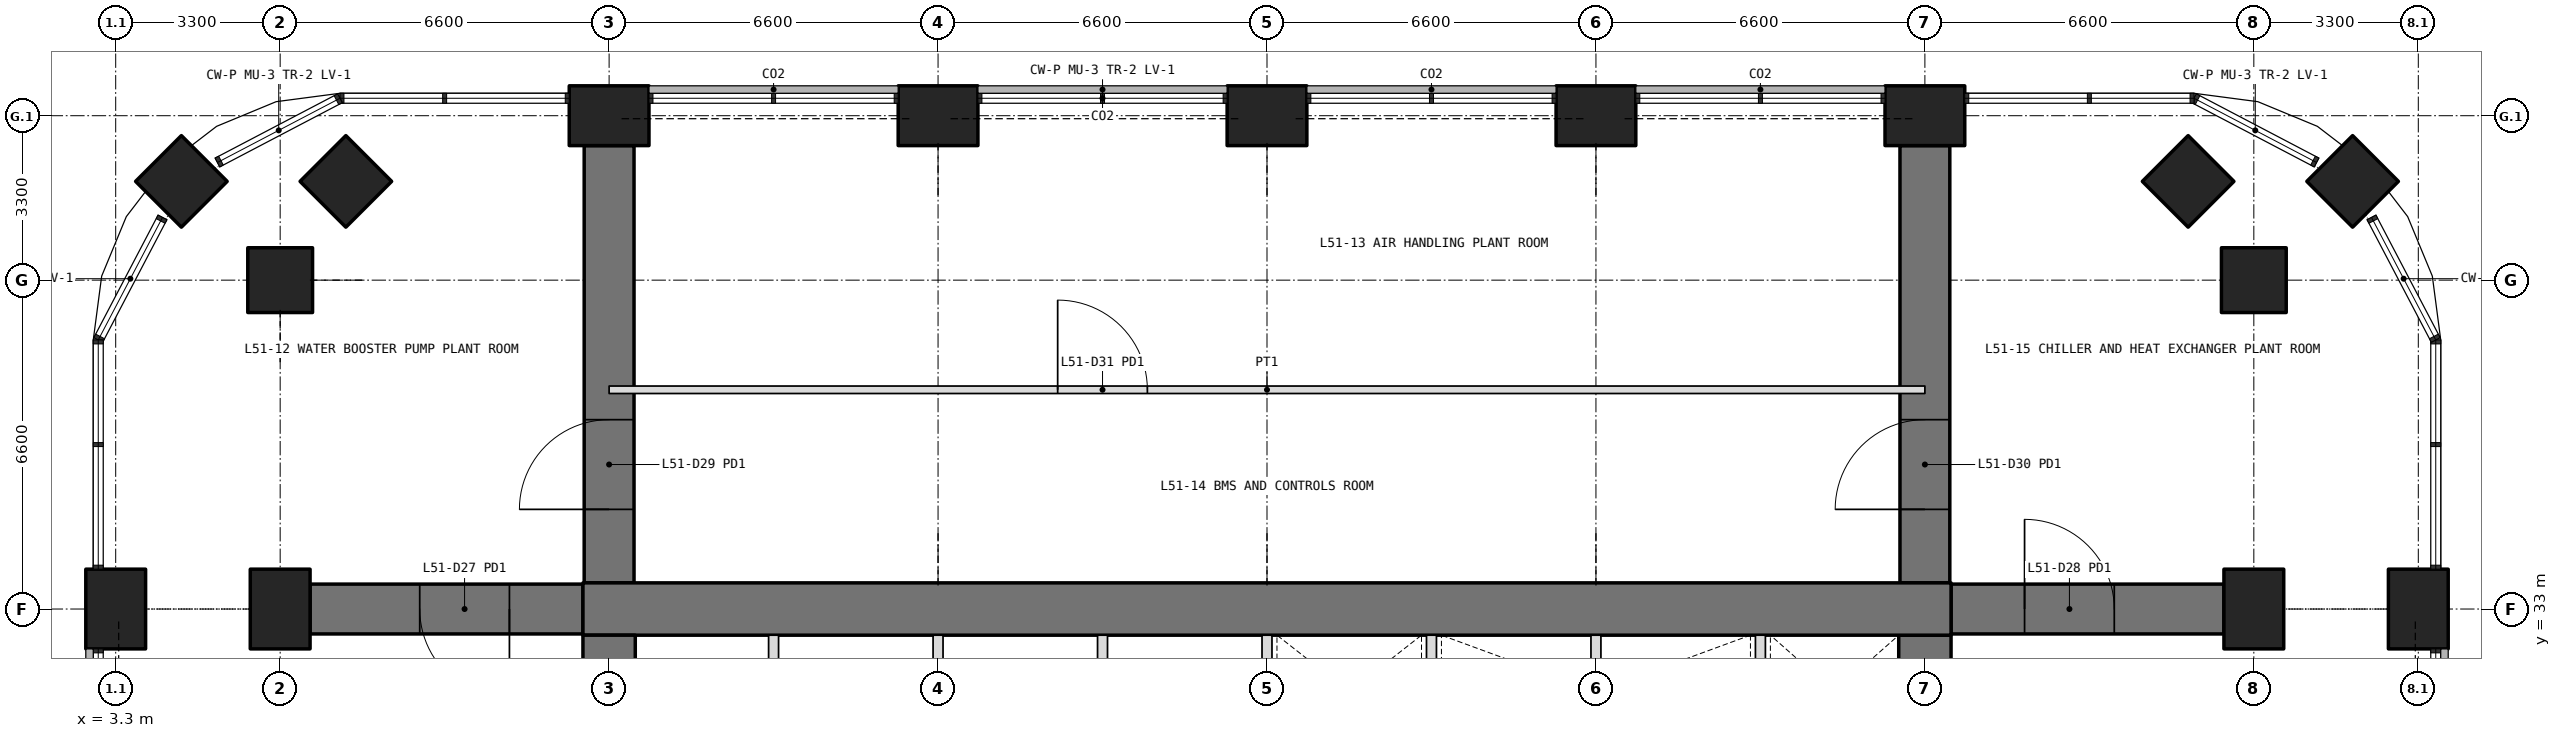
"""IFC4 building model, lengths in metres.
Left out: names, types, materials, properties, quantities, classifications, styles, units other than length and angle.
Written with IfcOpenShell. Run it as: python <this file> out.ifc"""

import sys

from ifc_helpers import new_model, si_unit, direction, frame, frame_2d, origin, origin_2d, place, context, subcontext, project, spatial, rectangle, extrude, element, fill, save


model = new_model("IFC4")
c1 = context("Model", 3, precision=1e-05, world=origin(), true_north=direction((0.0, 1.0)))
c2 = subcontext(c1, "Body", "Model", "MODEL_VIEW")
j1 = project(units=[si_unit("LENGTHUNIT", "METRE"), si_unit("PLANEANGLEUNIT", "RADIAN")], contexts=[c1])
p1 = place(None, origin())
s1 = spatial("IfcSite", under=j1, at=p1, CompositionType="ELEMENT")
p2 = place(p1, origin())
s2 = spatial("IfcBuilding", under=s1, at=p2, CompositionType="ELEMENT")
p3 = place(p2, frame((0.0, 0.0, 222.9)))
s3 = spatial("IfcBuildingStorey", under=s2, at=p3, CompositionType="ELEMENT", Elevation=222.9)
for number, where, z_axis, x_axis in (
    (1, (4.618, 41.582, 0.0), (0.0, 0.0, 1.0), (0.707, 0.707, 0.0)),
    (2, (48.182, 41.582, 0.0), (0.0, 0.0, 1.0), (0.707, 0.707, 0.0)),
):
    element("IfcColumn", number, at=place(p3, frame(where, z_axis=z_axis, x_axis=x_axis)), inside=s3, PredefinedType="COLUMN", context=c2, shape_type="SweptSolid", body=[
        extrude(rectangle(XDim=1.3, YDim=1.3, at=origin_2d()), origin(), (0.0, 0.0, 1.0), 6.3),
    ])
for number, where, z_axis, x_axis in (
    (3, (3.3, 33.0, 0.0), (0.0, 0.0, 1.0), (0.0, 1.0, 0.0)),
    (4, (49.5, 33.0, 0.0), (0.0, 0.0, 1.0), (0.0, 1.0, 0.0)),
    (5, (13.2, 42.9, 0.0), (0.0, 0.0, 1.0), (1.0, 0.0, 0.0)),
    (6, (19.8, 42.9, 0.0), (0.0, 0.0, 1.0), (1.0, 0.0, 0.0)),
    (7, (26.4, 42.9, 0.0), (0.0, 0.0, 1.0), (1.0, 0.0, 0.0)),
    (8, (33.0, 42.9, 0.0), (0.0, 0.0, 1.0), (1.0, 0.0, 0.0)),
    (9, (39.6, 42.9, 0.0), (0.0, 0.0, 1.0), (1.0, 0.0, 0.0)),
):
    element("IfcColumn", number, at=place(p3, frame(where, z_axis=z_axis, x_axis=x_axis)), inside=s3, PredefinedType="COLUMN", context=c2, shape_type="SweptSolid", body=[
        extrude(rectangle(XDim=1.6, YDim=1.2, at=origin_2d()), origin(), (0.0, 0.0, 1.0), 6.3),
    ])
for number, where, z_axis, x_axis in (
    (10, (6.6, 39.6, 0.0), (0.0, 0.0, 1.0), (1.0, 0.0, 0.0)),
    (11, (46.2, 39.6, 0.0), (0.0, 0.0, 1.0), (1.0, 0.0, 0.0)),
    (12, (7.918, 41.582, 0.0), (0.0, 0.0, 1.0), (0.707, 0.707, 0.0)),
    (13, (44.882, 41.582, 0.0), (0.0, 0.0, 1.0), (0.707, 0.707, 0.0)),
):
    element("IfcColumn", number, at=place(p3, frame(where, z_axis=z_axis, x_axis=x_axis)), inside=s3, PredefinedType="COLUMN", context=c2, shape_type="SweptSolid", body=[
        extrude(rectangle(XDim=1.3, YDim=1.3, at=origin_2d()), origin(), (0.0, 0.0, 1.0), 6.3),
    ])
for number, where, z_axis, x_axis in (
    (14, (6.6, 33.0, 0.0), (0.0, 0.0, 1.0), (0.0, 1.0, 0.0)),
    (15, (46.2, 33.0, 0.0), (0.0, 0.0, 1.0), (0.0, 1.0, 0.0)),
):
    element("IfcColumn", number, at=place(p3, frame(where, z_axis=z_axis, x_axis=x_axis)), inside=s3, PredefinedType="COLUMN", context=c2, shape_type="SweptSolid", body=[
        extrude(rectangle(XDim=1.6, YDim=1.2, at=origin_2d()), origin(), (0.0, 0.0, 1.0), 6.3),
    ])
p4 = place(p3, frame((13.2, 33.525, 0.0), z_axis=(0.0, 0.0, 1.0), x_axis=(0.0, 1.0, 0.0)))
e16 = element("IfcWall", 16, at=p4, inside=s3, PredefinedType="SHEAR", context=c2, shape_type="SweptSolid", body=[
    extrude(rectangle(XDim=8.775, YDim=1.0, at=frame_2d((4.388, 0.0))), origin(), (0.0, 0.0, 1.0), 6.0),
])
p5 = place(p4, frame((1.475, 0.0, 0.0)))
e17 = element("IfcOpeningElement", 17, at=p5, cuts=e16, PredefinedType="OPENING", context=c2, shape_type="SweptSolid", body=[
    extrude(rectangle(XDim=1.8, YDim=2.4, at=frame_2d((0.9, 1.2))), frame((0.0, 0.51, 0.0), z_axis=(0.0, -1.0, 0.0), x_axis=(1.0, 0.0, 0.0)), (0.0, 0.0, 1.0), 1.02),
])
p6 = place(p3, frame((39.6, 33.525, 0.0), z_axis=(0.0, 0.0, 1.0), x_axis=(0.0, 1.0, 0.0)))
e18 = element("IfcWall", 18, at=p6, inside=s3, PredefinedType="SHEAR", context=c2, shape_type="SweptSolid", body=[
    extrude(rectangle(XDim=8.775, YDim=1.0, at=frame_2d((4.388, 0.0))), origin(), (0.0, 0.0, 1.0), 6.0),
])
p7 = place(p6, frame((1.475, 0.0, 0.0)))
e19 = element("IfcOpeningElement", 19, at=p7, cuts=e18, PredefinedType="OPENING", context=c2, shape_type="SweptSolid", body=[
    extrude(rectangle(XDim=1.8, YDim=2.4, at=frame_2d((0.9, 1.2))), frame((0.0, 0.51, 0.0), z_axis=(0.0, -1.0, 0.0), x_axis=(1.0, 0.0, 0.0)), (0.0, 0.0, 1.0), 1.02),
])
p8 = place(p3, frame((12.675, 33.0, 0.0), z_axis=(0.0, 0.0, 1.0), x_axis=(-1.0, 0.0, 0.0)))
e20 = element("IfcWall", 20, at=p8, inside=s3, PredefinedType="SHEAR", context=c2, shape_type="SweptSolid", body=[
    extrude(rectangle(XDim=5.475, YDim=1.0, at=frame_2d((2.738, 0.0))), origin(), (0.0, 0.0, 1.0), 6.0),
])
p9 = place(p8, frame((1.475, 0.0, 0.0)))
e21 = element("IfcOpeningElement", 21, at=p9, cuts=e20, PredefinedType="OPENING", context=c2, shape_type="SweptSolid", body=[
    extrude(rectangle(XDim=1.8, YDim=2.4, at=frame_2d((0.9, 1.2))), frame((0.0, 0.51, 0.0), z_axis=(0.0, -1.0, 0.0), x_axis=(1.0, 0.0, 0.0)), (0.0, 0.0, 1.0), 1.02),
])
p10 = place(p3, frame((40.125, 33.0, 0.0), z_axis=(0.0, 0.0, 1.0), x_axis=(1.0, 0.0, 0.0)))
e22 = element("IfcWall", 22, at=p10, inside=s3, PredefinedType="SHEAR", context=c2, shape_type="SweptSolid", body=[
    extrude(rectangle(XDim=5.475, YDim=1.0, at=frame_2d((2.738, 0.0))), origin(), (0.0, 0.0, 1.0), 6.0),
])
p11 = place(p10, frame((1.475, 0.0, 0.0)))
e23 = element("IfcOpeningElement", 23, at=p11, cuts=e22, PredefinedType="OPENING", context=c2, shape_type="SweptSolid", body=[
    extrude(rectangle(XDim=1.8, YDim=2.4, at=frame_2d((0.9, 1.2))), frame((0.0, 0.51, 0.0), z_axis=(0.0, -1.0, 0.0), x_axis=(1.0, 0.0, 0.0)), (0.0, 0.0, 1.0), 1.02),
])
p12 = place(p3, frame((39.6, 13.725, 0.0), z_axis=(0.0, 0.0, 1.0), x_axis=(0.0, 1.0, 0.0)))
e24 = element("IfcWall", 24, at=p12, inside=s3, PredefinedType="SHEAR", context=c2, shape_type="SweptSolid", body=[
    extrude(rectangle(XDim=18.75, YDim=1.05, at=frame_2d((9.375, 0.0))), origin(), (0.0, 0.0, 1.0), 6.3),
])
p13 = place(p12, frame((3.025, 0.0, 0.0)))
e25 = element("IfcOpeningElement", 25, at=p13, cuts=e24, PredefinedType="OPENING", context=c2, shape_type="SweptSolid", body=[
    extrude(rectangle(XDim=1.6, YDim=2.1, at=frame_2d((0.8, 1.05))), frame((0.0, 0.535, 0.0), z_axis=(0.0, -1.0, 0.0), x_axis=(1.0, 0.0, 0.0)), (0.0, 0.0, 1.0), 1.07),
])
p14 = place(p12, frame((13.825, 0.0, 0.0)))
e26 = element("IfcOpeningElement", 26, at=p14, cuts=e24, PredefinedType="OPENING", context=c2, shape_type="SweptSolid", body=[
    extrude(rectangle(XDim=1.6, YDim=2.1, at=frame_2d((0.8, 1.05))), frame((0.0, 0.535, 0.0), z_axis=(0.0, -1.0, 0.0), x_axis=(1.0, 0.0, 0.0)), (0.0, 0.0, 1.0), 1.07),
])
p15 = place(p3, frame((40.125, 33.0, 0.0), z_axis=(0.0, 0.0, 1.0), x_axis=(-1.0, 0.0, 0.0)))
e27 = element("IfcWall", 27, at=p15, inside=s3, PredefinedType="SHEAR", context=c2, shape_type="SweptSolid", body=[
    extrude(rectangle(XDim=27.45, YDim=1.05, at=frame_2d((13.725, 0.0))), origin(), (0.0, 0.0, 1.0), 6.3),
])
p16 = place(p3, frame((13.2, 32.475, 0.0), z_axis=(0.0, 0.0, 1.0), x_axis=(0.0, -1.0, 0.0)))
e28 = element("IfcWall", 28, at=p16, inside=s3, PredefinedType="SHEAR", context=c2, shape_type="SweptSolid", body=[
    extrude(rectangle(XDim=18.75, YDim=1.05, at=frame_2d((9.375, 0.0))), origin(), (0.0, 0.0, 1.0), 6.3),
])
p17 = place(p16, frame((14.125, 0.0, 0.0)))
e29 = element("IfcOpeningElement", 29, at=p17, cuts=e28, PredefinedType="OPENING", context=c2, shape_type="SweptSolid", body=[
    extrude(rectangle(XDim=1.6, YDim=2.1, at=frame_2d((0.8, 1.05))), frame((0.0, 0.535, 0.0), z_axis=(0.0, -1.0, 0.0), x_axis=(1.0, 0.0, 0.0)), (0.0, 0.0, 1.0), 1.07),
])
p18 = place(p16, frame((3.325, 0.0, 0.0)))
e30 = element("IfcOpeningElement", 30, at=p18, cuts=e28, PredefinedType="OPENING", context=c2, shape_type="SweptSolid", body=[
    extrude(rectangle(XDim=1.6, YDim=2.1, at=frame_2d((0.8, 1.05))), frame((0.0, 0.535, 0.0), z_axis=(0.0, -1.0, 0.0), x_axis=(1.0, 0.0, 0.0)), (0.0, 0.0, 1.0), 1.07),
])
for number, where, z_axis, x_axis in (
    (31, (16.5, 30.2, 0.0), (0.0, 0.0, 1.0), (0.0, 1.0, 0.0)),
    (32, (19.8, 30.2, 0.0), (0.0, 0.0, 1.0), (0.0, 1.0, 0.0)),
    (33, (23.1, 30.2, 0.0), (0.0, 0.0, 1.0), (0.0, 1.0, 0.0)),
    (34, (26.4, 30.2, 0.0), (0.0, 0.0, 1.0), (0.0, 1.0, 0.0)),
    (35, (29.7, 30.2, 0.0), (0.0, 0.0, 1.0), (0.0, 1.0, 0.0)),
    (36, (33.0, 30.2, 0.0), (0.0, 0.0, 1.0), (0.0, 1.0, 0.0)),
    (37, (36.3, 30.2, 0.0), (0.0, 0.0, 1.0), (0.0, 1.0, 0.0)),
):
    element("IfcWall", number, at=place(p3, frame(where, z_axis=z_axis, x_axis=x_axis)), inside=s3, PredefinedType="PARTITIONING", context=c2, shape_type="SweptSolid", body=[
        extrude(rectangle(XDim=2.275, YDim=0.2, at=frame_2d((1.138, 0.0))), origin(), (0.0, 0.0, 1.0), 6.3),
    ])
p19 = place(p3, frame((13.2, 37.4, 0.0), z_axis=(0.0, 0.0, 1.0), x_axis=(1.0, 0.0, 0.0)))
e38 = element("IfcWall", 38, at=p19, inside=s3, PredefinedType="PARTITIONING", context=c2, shape_type="SweptSolid", body=[
    extrude(rectangle(XDim=26.4, YDim=0.15, at=frame_2d((13.2, 0.0))), origin(), (0.0, 0.0, 1.0), 4.0),
])
p20 = place(p19, frame((9.0, 0.0, 0.0)))
e39 = element("IfcOpeningElement", 39, at=p20, cuts=e38, PredefinedType="OPENING", context=c2, shape_type="SweptSolid", body=[
    extrude(rectangle(XDim=1.8, YDim=2.4, at=frame_2d((0.9, 1.2))), frame((0.0, 0.085, 0.0), z_axis=(0.0, -1.0, 0.0), x_axis=(1.0, 0.0, 0.0)), (0.0, 0.0, 1.0), 0.17),
])
p21 = place(p20, origin())
e40 = element("IfcDoor", 40, at=p21, inside=s3, OperationType="DOUBLE_DOOR_SINGLE_SWING", PredefinedType="DOOR", context=c2, shape_type="SweptSolid", body=[
    extrude(rectangle(XDim=1.8, YDim=2.4, at=frame_2d((0.9, 1.2))), frame((0.0, 0.025, 0.0), z_axis=(0.0, -1.0, 0.0), x_axis=(1.0, 0.0, 0.0)), (0.0, 0.0, 1.0), 0.05),
])
fill(e39, e40)
p22 = place(p5, origin())
e41 = element("IfcDoor", 41, at=p22, inside=s3, OperationType="DOUBLE_DOOR_SINGLE_SWING", PredefinedType="DOOR", context=c2, shape_type="SweptSolid", body=[
    extrude(rectangle(XDim=1.8, YDim=2.4, at=frame_2d((0.9, 1.2))), frame((0.0, 0.025, 0.0), z_axis=(0.0, -1.0, 0.0), x_axis=(1.0, 0.0, 0.0)), (0.0, 0.0, 1.0), 0.05),
])
fill(e17, e41)
p23 = place(p7, origin())
e42 = element("IfcDoor", 42, at=p23, inside=s3, OperationType="DOUBLE_DOOR_SINGLE_SWING", PredefinedType="DOOR", context=c2, shape_type="SweptSolid", body=[
    extrude(rectangle(XDim=1.8, YDim=2.4, at=frame_2d((0.9, 1.2))), frame((0.0, 0.025, 0.0), z_axis=(0.0, -1.0, 0.0), x_axis=(1.0, 0.0, 0.0)), (0.0, 0.0, 1.0), 0.05),
])
fill(e19, e42)
p24 = place(p9, origin())
e43 = element("IfcDoor", 43, at=p24, inside=s3, OperationType="DOUBLE_DOOR_SINGLE_SWING", PredefinedType="DOOR", context=c2, shape_type="SweptSolid", body=[
    extrude(rectangle(XDim=1.8, YDim=2.4, at=frame_2d((0.9, 1.2))), frame((0.0, 0.025, 0.0), z_axis=(0.0, -1.0, 0.0), x_axis=(1.0, 0.0, 0.0)), (0.0, 0.0, 1.0), 0.05),
])
fill(e21, e43)
p25 = place(p11, origin())
e44 = element("IfcDoor", 44, at=p25, inside=s3, OperationType="DOUBLE_DOOR_SINGLE_SWING", PredefinedType="DOOR", context=c2, shape_type="SweptSolid", body=[
    extrude(rectangle(XDim=1.8, YDim=2.4, at=frame_2d((0.9, 1.2))), frame((0.0, 0.025, 0.0), z_axis=(0.0, -1.0, 0.0), x_axis=(1.0, 0.0, 0.0)), (0.0, 0.0, 1.0), 0.05),
])
fill(e23, e44)
save(model, sys.argv[1])
